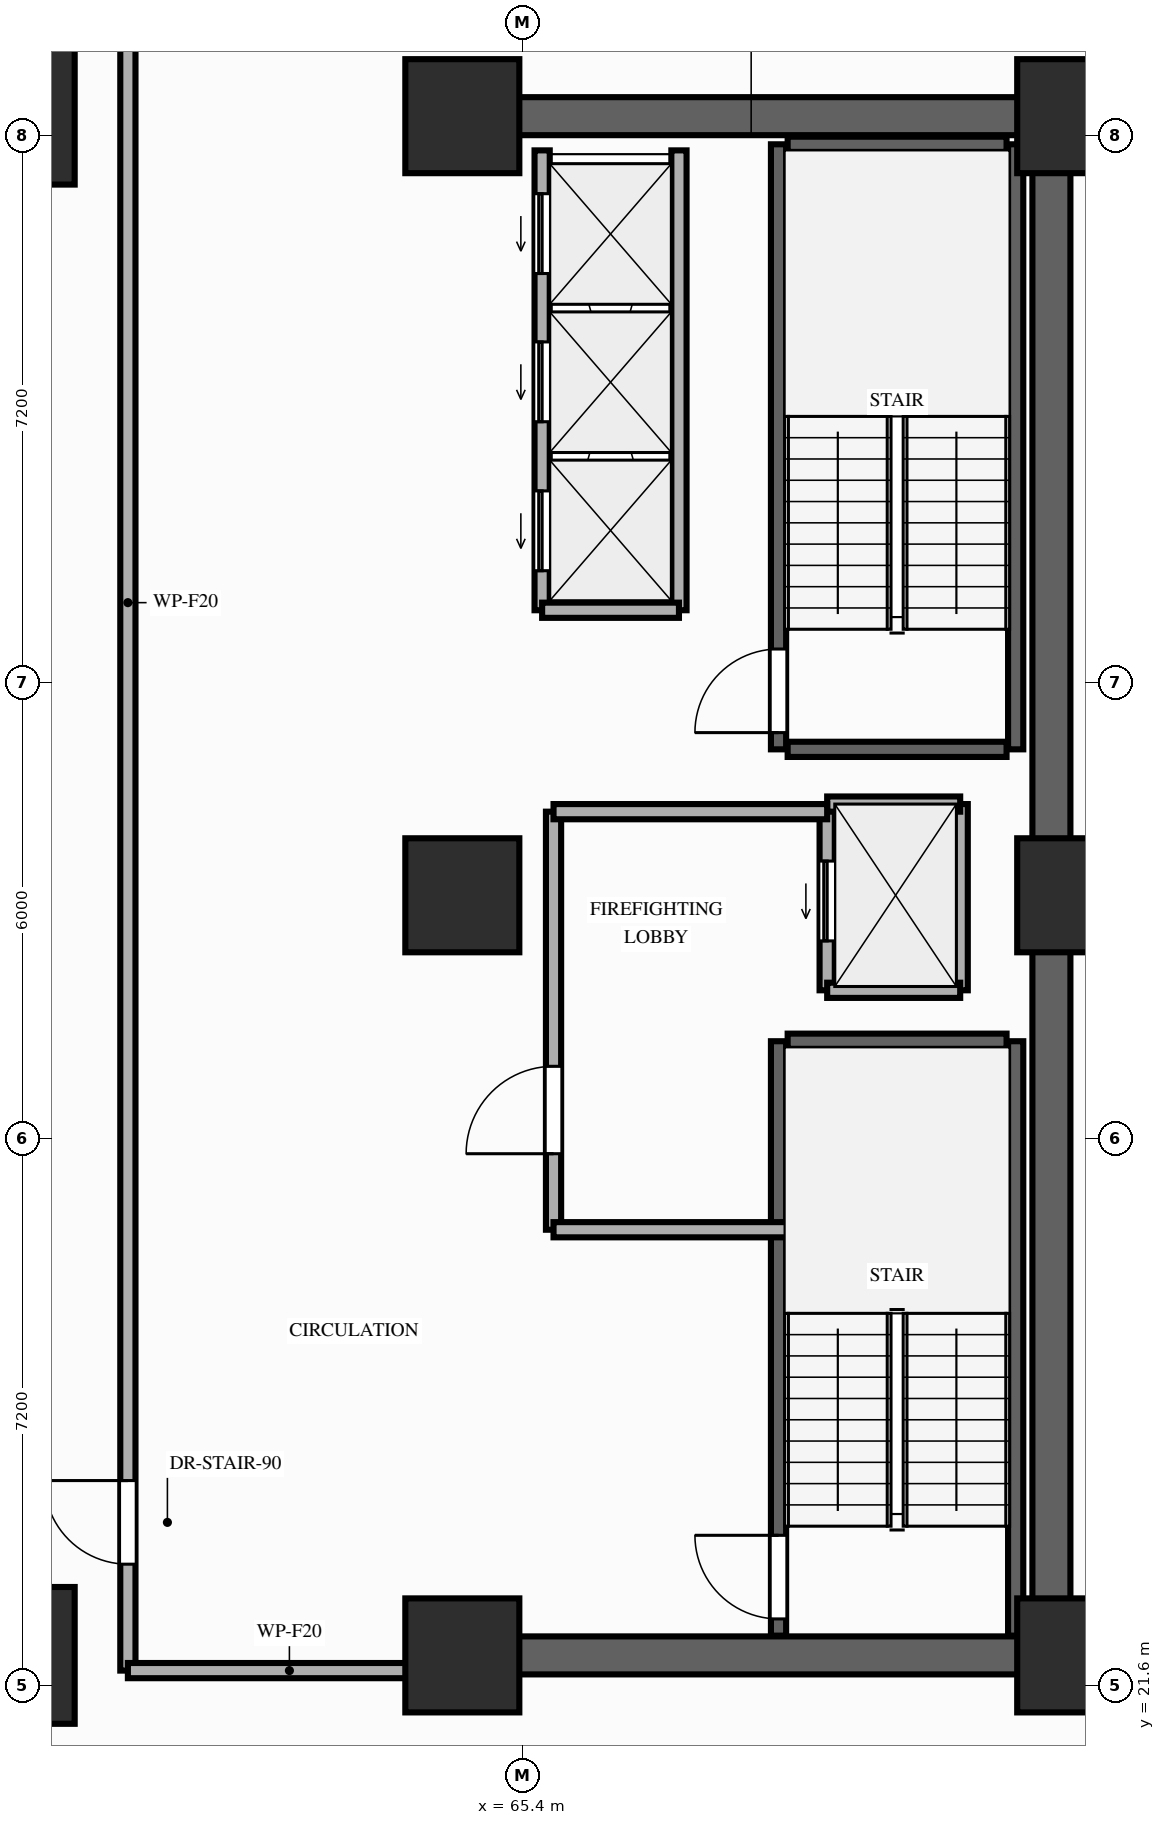
"""IFC4 building model, lengths in metres.
Left out: names, types, materials, properties, quantities, classifications, styles, units other than length and angle.
Written with IfcOpenShell. Run it as: python <this file> out.ifc"""

import sys

from ifc_helpers import new_model, si_unit, direction, frame, frame_2d, origin, origin_2d, place, context, subcontext, project, spatial, rectangle, extrude, element, fill, save


model = new_model("IFC4")
c1 = context("Model", 3, precision=1e-05, world=origin(), true_north=direction((0.0, 1.0)))
c2 = subcontext(c1, "Body", "Model", "MODEL_VIEW")
j1 = project(units=[si_unit("LENGTHUNIT", "METRE"), si_unit("PLANEANGLEUNIT", "RADIAN")], contexts=[c1])
p1 = place(None, origin())
s1 = spatial("IfcSite", under=j1, at=p1, CompositionType="ELEMENT")
p2 = place(p1, origin())
s2 = spatial("IfcBuilding", under=s1, at=p2, CompositionType="ELEMENT")
p3 = place(p2, frame((0.0, 0.0, -7.6)))
s3 = spatial("IfcBuildingStorey", under=s2, at=p3, CompositionType="ELEMENT", Elevation=-7.6)
for number, where, z_axis, x_axis in (
    (1, (64.6, 22.0, 0.0), (0.0, 0.0, 1.0), (1.0, 0.0, 0.0)),
    (2, (72.65, 22.0, 0.0), (0.0, 0.0, 1.0), (1.0, 0.0, 0.0)),
    (3, (64.6, 32.0, 0.0), (0.0, 0.0, 1.0), (1.0, 0.0, 0.0)),
    (4, (72.65, 32.0, 0.0), (0.0, 0.0, 1.0), (1.0, 0.0, 0.0)),
    (5, (64.6, 42.25, 0.0), (0.0, 0.0, 1.0), (1.0, 0.0, 0.0)),
    (6, (72.65, 42.25, 0.0), (0.0, 0.0, 1.0), (1.0, 0.0, 0.0)),
):
    element("IfcColumn", number, at=place(p3, frame(where, z_axis=z_axis, x_axis=x_axis)), inside=s3, PredefinedType="COLUMN", context=c2, shape_type="SweptSolid", body=[
        extrude(rectangle(XDim=1.5, YDim=1.5, at=origin_2d()), origin(), (0.0, 0.0, 1.0), 3.8),
    ])
for number, where, z_axis, x_axis in (
    (7, (58.6, 22.0, 0.0), (0.0, 0.0, 1.0), (1.0, 0.0, 0.0)),
    (8, (58.6, 42.25, 0.0), (0.0, 0.0, 1.0), (1.0, 0.0, 0.0)),
):
    element("IfcColumn", number, at=place(p3, frame(where, z_axis=z_axis, x_axis=x_axis)), inside=s3, PredefinedType="COLUMN", context=c2, shape_type="SweptSolid", body=[
        extrude(rectangle(XDim=1.8, YDim=1.8, at=origin_2d()), origin(), (0.0, 0.0, 1.0), 3.8),
    ])
p4 = place(p3, frame((72.35, 22.0, 0.0), z_axis=(0.0, 0.0, 1.0), x_axis=(0.0, 1.0, 0.0)))
e9 = element("IfcWall", 9, at=p4, inside=s3, PredefinedType="SHEAR", context=c2, shape_type="SweptSolid", body=[
    extrude(rectangle(XDim=20.25, YDim=0.5, at=frame_2d((10.125, 0.0))), origin(), (0.0, 0.0, 1.0), 3.55),
])
for number, where, z_axis, x_axis in (
    (10, (64.6, 42.25, 0.0), (0.0, 0.0, 1.0), (1.0, 0.0, 0.0)),
    (11, (64.6, 22.0, 0.0), (0.0, 0.0, 1.0), (1.0, 0.0, 0.0)),
):
    element("IfcWall", number, at=place(p3, frame(where, z_axis=z_axis, x_axis=x_axis)), inside=s3, PredefinedType="SHEAR", context=c2, shape_type="SweptSolid", body=[
        extrude(rectangle(XDim=7.5, YDim=0.5, at=frame_2d((3.75, 0.0))), origin(), (0.0, 0.0, 1.0), 3.55),
    ])
p5 = place(p3, frame((68.76, 22.26, 0.0), z_axis=(0.0, 0.0, 1.0), x_axis=(0.0, 1.0, 0.0)))
e12 = element("IfcWall", 12, at=p5, inside=s3, PredefinedType="SHEAR", context=c2, shape_type="SweptSolid", body=[
    extrude(rectangle(XDim=7.82, YDim=0.2, at=frame_2d((3.91, 0.0))), origin(), (0.0, 0.0, 1.0), 3.55),
])
p6 = place(p5, frame((0.22, 0.0, 0.0)))
e13 = element("IfcOpeningElement", 13, at=p6, cuts=e12, PredefinedType="OPENING", context=c2, shape_type="SweptSolid", body=[
    extrude(rectangle(XDim=1.1, YDim=2.15, at=frame_2d((0.55, 1.075))), frame((0.0, 0.11, 0.0), z_axis=(0.0, -1.0, 0.0), x_axis=(1.0, 0.0, 0.0)), (0.0, 0.0, 1.0), 0.22),
])
p7 = place(p3, frame((71.88, 22.26, 0.0), z_axis=(0.0, 0.0, 1.0), x_axis=(0.0, 1.0, 0.0)))
e14 = element("IfcWall", 14, at=p7, inside=s3, PredefinedType="SHEAR", context=c2, shape_type="SweptSolid", body=[
    extrude(rectangle(XDim=7.82, YDim=0.2, at=frame_2d((3.91, 0.0))), origin(), (0.0, 0.0, 1.0), 3.55),
])
p8 = place(p3, frame((68.88, 30.08, 0.0), z_axis=(0.0, 0.0, 1.0), x_axis=(1.0, 0.0, 0.0)))
e15 = element("IfcWall", 15, at=p8, inside=s3, PredefinedType="SHEAR", context=c2, shape_type="SweptSolid", body=[
    extrude(rectangle(XDim=2.88, YDim=0.2, at=frame_2d((1.44, 0.0))), origin(), (0.0, 0.0, 1.0), 3.55),
])
p9 = place(p3, frame((68.76, 33.92, 0.0), z_axis=(0.0, 0.0, 1.0), x_axis=(0.0, 1.0, 0.0)))
e16 = element("IfcWall", 16, at=p9, inside=s3, PredefinedType="SHEAR", context=c2, shape_type="SweptSolid", body=[
    extrude(rectangle(XDim=7.96, YDim=0.2, at=frame_2d((3.98, 0.0))), origin(), (0.0, 0.0, 1.0), 3.55),
])
p10 = place(p9, frame((0.22, 0.0, 0.0)))
e17 = element("IfcOpeningElement", 17, at=p10, cuts=e16, PredefinedType="OPENING", context=c2, shape_type="SweptSolid", body=[
    extrude(rectangle(XDim=1.1, YDim=2.15, at=frame_2d((0.55, 1.075))), frame((0.0, 0.11, 0.0), z_axis=(0.0, -1.0, 0.0), x_axis=(1.0, 0.0, 0.0)), (0.0, 0.0, 1.0), 0.22),
])
p11 = place(p3, frame((71.88, 33.92, 0.0), z_axis=(0.0, 0.0, 1.0), x_axis=(0.0, 1.0, 0.0)))
e18 = element("IfcWall", 18, at=p11, inside=s3, PredefinedType="SHEAR", context=c2, shape_type="SweptSolid", body=[
    extrude(rectangle(XDim=7.96, YDim=0.2, at=frame_2d((3.98, 0.0))), origin(), (0.0, 0.0, 1.0), 3.55),
])
for number, where, z_axis, x_axis in (
    (19, (68.88, 41.88, 0.0), (0.0, 0.0, 1.0), (1.0, 0.0, 0.0)),
    (20, (68.88, 33.92, 0.0), (0.0, 0.0, 1.0), (1.0, 0.0, 0.0)),
):
    element("IfcWall", number, at=place(p3, frame(where, z_axis=z_axis, x_axis=x_axis)), inside=s3, PredefinedType="SHEAR", context=c2, shape_type="SweptSolid", body=[
        extrude(rectangle(XDim=2.88, YDim=0.2, at=frame_2d((1.44, 0.0))), origin(), (0.0, 0.0, 1.0), 3.55),
    ])
p12 = place(p3, frame((65.65, 35.75, 0.0), z_axis=(0.0, 0.0, 1.0), x_axis=(0.0, 1.0, 0.0)))
e21 = element("IfcWall", 21, at=p12, inside=s3, PredefinedType="MOVABLE", context=c2, shape_type="SweptSolid", body=[
    extrude(rectangle(XDim=6.05, YDim=0.2, at=frame_2d((3.025, 0.0))), origin(), (0.0, 0.0, 1.0), 3.55),
])
p13 = place(p12, frame((0.52, 0.0, 0.0)))
e22 = element("IfcOpeningElement", 22, at=p13, cuts=e21, PredefinedType="OPENING", context=c2, shape_type="SweptSolid", body=[
    extrude(rectangle(XDim=1.05, YDim=2.15, at=frame_2d((0.525, 1.075))), frame((0.0, 0.11, 0.0), z_axis=(0.0, -1.0, 0.0), x_axis=(1.0, 0.0, 0.0)), (0.0, 0.0, 1.0), 0.22),
])
p14 = place(p12, frame((2.48, 0.0, 0.0)))
e23 = element("IfcOpeningElement", 23, at=p14, cuts=e21, PredefinedType="OPENING", context=c2, shape_type="SweptSolid", body=[
    extrude(rectangle(XDim=1.05, YDim=2.15, at=frame_2d((0.525, 1.075))), frame((0.0, 0.11, 0.0), z_axis=(0.0, -1.0, 0.0), x_axis=(1.0, 0.0, 0.0)), (0.0, 0.0, 1.0), 0.22),
])
p15 = place(p12, frame((4.43, 0.0, 0.0)))
e24 = element("IfcOpeningElement", 24, at=p15, cuts=e21, PredefinedType="OPENING", context=c2, shape_type="SweptSolid", body=[
    extrude(rectangle(XDim=1.05, YDim=2.15, at=frame_2d((0.525, 1.075))), frame((0.0, 0.11, 0.0), z_axis=(0.0, -1.0, 0.0), x_axis=(1.0, 0.0, 0.0)), (0.0, 0.0, 1.0), 0.22),
])
p16 = place(p3, frame((67.45, 35.75, 0.0), z_axis=(0.0, 0.0, 1.0), x_axis=(0.0, 1.0, 0.0)))
e25 = element("IfcWall", 25, at=p16, inside=s3, PredefinedType="MOVABLE", context=c2, shape_type="SweptSolid", body=[
    extrude(rectangle(XDim=6.05, YDim=0.2, at=frame_2d((3.025, 0.0))), origin(), (0.0, 0.0, 1.0), 3.55),
])
p17 = place(p3, frame((65.65, 35.75, 0.0), z_axis=(0.0, 0.0, 1.0), x_axis=(1.0, 0.0, 0.0)))
e26 = element("IfcWall", 26, at=p17, inside=s3, PredefinedType="MOVABLE", context=c2, shape_type="SweptSolid", body=[
    extrude(rectangle(XDim=1.8, YDim=0.2, at=frame_2d((0.9, 0.0))), origin(), (0.0, 0.0, 1.0), 3.55),
])
p18 = place(p3, frame((69.4, 30.75, 0.0), z_axis=(0.0, 0.0, 1.0), x_axis=(0.0, 1.0, 0.0)))
e27 = element("IfcWall", 27, at=p18, inside=s3, PredefinedType="MOVABLE", context=c2, shape_type="SweptSolid", body=[
    extrude(rectangle(XDim=2.45, YDim=0.2, at=frame_2d((1.225, 0.0))), origin(), (0.0, 0.0, 1.0), 3.55),
])
p19 = place(p18, frame((0.65, 0.0, 0.0)))
e28 = element("IfcOpeningElement", 28, at=p19, cuts=e27, PredefinedType="OPENING", context=c2, shape_type="SweptSolid", body=[
    extrude(rectangle(XDim=1.05, YDim=2.15, at=frame_2d((0.525, 1.075))), frame((0.0, 0.11, 0.0), z_axis=(0.0, -1.0, 0.0), x_axis=(1.0, 0.0, 0.0)), (0.0, 0.0, 1.0), 0.22),
])
p20 = place(p3, frame((71.15, 30.75, 0.0), z_axis=(0.0, 0.0, 1.0), x_axis=(0.0, 1.0, 0.0)))
e29 = element("IfcWall", 29, at=p20, inside=s3, PredefinedType="MOVABLE", context=c2, shape_type="SweptSolid", body=[
    extrude(rectangle(XDim=2.45, YDim=0.2, at=frame_2d((1.225, 0.0))), origin(), (0.0, 0.0, 1.0), 3.55),
])
for number, where, z_axis, x_axis in (
    (30, (69.4, 33.2, 0.0), (0.0, 0.0, 1.0), (1.0, 0.0, 0.0)),
    (31, (69.4, 30.75, 0.0), (0.0, 0.0, 1.0), (1.0, 0.0, 0.0)),
):
    element("IfcWall", number, at=place(p3, frame(where, z_axis=z_axis, x_axis=x_axis)), inside=s3, PredefinedType="MOVABLE", context=c2, shape_type="SweptSolid", body=[
        extrude(rectangle(XDim=1.75, YDim=0.2, at=frame_2d((0.875, 0.0))), origin(), (0.0, 0.0, 1.0), 3.55),
    ])
p21 = place(p3, frame((65.8, 27.6, 0.0), z_axis=(0.0, 0.0, 1.0), x_axis=(0.0, 1.0, 0.0)))
e32 = element("IfcWall", 32, at=p21, inside=s3, PredefinedType="PARTITIONING", context=c2, shape_type="SweptSolid", body=[
    extrude(rectangle(XDim=5.5, YDim=0.2, at=frame_2d((2.75, 0.0))), origin(), (0.0, 0.0, 1.0), 3.55),
])
p22 = place(p21, frame((1.0, 0.0, 0.0)))
e33 = element("IfcOpeningElement", 33, at=p22, cuts=e32, PredefinedType="OPENING", context=c2, shape_type="SweptSolid", body=[
    extrude(rectangle(XDim=1.15, YDim=2.15, at=frame_2d((0.575, 1.075))), frame((0.0, 0.11, 0.0), z_axis=(0.0, -1.0, 0.0), x_axis=(1.0, 0.0, 0.0)), (0.0, 0.0, 1.0), 0.22),
])
p23 = place(p3, frame((65.8, 33.1, 0.0), z_axis=(0.0, 0.0, 1.0), x_axis=(1.0, 0.0, 0.0)))
e34 = element("IfcWall", 34, at=p23, inside=s3, PredefinedType="PARTITIONING", context=c2, shape_type="SweptSolid", body=[
    extrude(rectangle(XDim=3.6, YDim=0.2, at=frame_2d((1.8, 0.0))), origin(), (0.0, 0.0, 1.0), 3.55),
])
p24 = place(p3, frame((65.8, 27.6, 0.0), z_axis=(0.0, 0.0, 1.0), x_axis=(1.0, 0.0, 0.0)))
e35 = element("IfcWall", 35, at=p24, inside=s3, PredefinedType="PARTITIONING", context=c2, shape_type="SweptSolid", body=[
    extrude(rectangle(XDim=3.4, YDim=0.2, at=frame_2d((1.7, 0.0))), origin(), (0.0, 0.0, 1.0), 3.55),
])
p25 = place(p3, frame((60.2, 21.8, 0.0), z_axis=(0.0, 0.0, 1.0), x_axis=(0.0, 1.0, 0.0)))
e36 = element("IfcWall", 36, at=p25, inside=s3, PredefinedType="PARTITIONING", context=c2, shape_type="SweptSolid", body=[
    extrude(rectangle(XDim=28.1, YDim=0.2, at=frame_2d((14.05, 0.0))), origin(), (0.0, 0.0, 1.0), 2.72),
])
p26 = place(p25, frame((1.4, 0.0, 0.0)))
e37 = element("IfcOpeningElement", 37, at=p26, cuts=e36, PredefinedType="OPENING", context=c2, shape_type="SweptSolid", body=[
    extrude(rectangle(XDim=1.1, YDim=2.15, at=frame_2d((0.55, 1.075))), frame((0.0, 0.11, 0.0), z_axis=(0.0, -1.0, 0.0), x_axis=(1.0, 0.0, 0.0)), (0.0, 0.0, 1.0), 0.22),
])
p27 = place(p3, frame((60.2, 21.8, 0.0), z_axis=(0.0, 0.0, 1.0), x_axis=(1.0, 0.0, 0.0)))
e38 = element("IfcWall", 38, at=p27, inside=s3, PredefinedType="PARTITIONING", context=c2, shape_type="SweptSolid", body=[
    extrude(rectangle(XDim=4.25, YDim=0.2, at=frame_2d((2.125, 0.0))), origin(), (0.0, 0.0, 1.0), 2.72),
])
p28 = place(p3, frame((72.65, 21.8, 0.0), z_axis=(0.0, 0.0, 1.0), x_axis=(1.0, 0.0, 0.0)))
e39 = element("IfcWall", 39, at=p28, inside=s3, PredefinedType="PARTITIONING", context=c2, shape_type="SweptSolid", body=[
    extrude(rectangle(XDim=9.65, YDim=0.2, at=frame_2d((4.825, 0.0))), origin(), (0.0, 0.0, 1.0), 2.72),
])
p29 = place(p6, origin())
e40 = element("IfcDoor", 40, at=p29, inside=s3, OperationType="SINGLE_SWING_RIGHT", PredefinedType="DOOR", context=c2, shape_type="SweptSolid", body=[
    extrude(rectangle(XDim=1.1, YDim=2.15, at=frame_2d((0.55, 1.075))), frame((0.0, 0.025, 0.0), z_axis=(0.0, -1.0, 0.0), x_axis=(1.0, 0.0, 0.0)), (0.0, 0.0, 1.0), 0.05),
])
fill(e13, e40)
p30 = place(p10, origin())
e41 = element("IfcDoor", 41, at=p30, inside=s3, OperationType="SINGLE_SWING_LEFT", PredefinedType="DOOR", context=c2, shape_type="SweptSolid", body=[
    extrude(rectangle(XDim=1.1, YDim=2.15, at=frame_2d((0.55, 1.075))), frame((0.0, 0.025, 0.0), z_axis=(0.0, -1.0, 0.0), x_axis=(1.0, 0.0, 0.0)), (0.0, 0.0, 1.0), 0.05),
])
fill(e17, e41)
p31 = place(p13, origin())
e42 = element("IfcDoor", 42, at=p31, inside=s3, OperationType="SLIDING_TO_LEFT", PredefinedType="DOOR", context=c2, shape_type="SweptSolid", body=[
    extrude(rectangle(XDim=1.05, YDim=2.15, at=frame_2d((0.525, 1.075))), frame((0.0, 0.025, 0.0), z_axis=(0.0, -1.0, 0.0), x_axis=(1.0, 0.0, 0.0)), (0.0, 0.0, 1.0), 0.05),
])
fill(e22, e42)
p32 = place(p14, origin())
e43 = element("IfcDoor", 43, at=p32, inside=s3, OperationType="SLIDING_TO_LEFT", PredefinedType="DOOR", context=c2, shape_type="SweptSolid", body=[
    extrude(rectangle(XDim=1.05, YDim=2.15, at=frame_2d((0.525, 1.075))), frame((0.0, 0.025, 0.0), z_axis=(0.0, -1.0, 0.0), x_axis=(1.0, 0.0, 0.0)), (0.0, 0.0, 1.0), 0.05),
])
fill(e23, e43)
p33 = place(p15, origin())
e44 = element("IfcDoor", 44, at=p33, inside=s3, OperationType="SLIDING_TO_LEFT", PredefinedType="DOOR", context=c2, shape_type="SweptSolid", body=[
    extrude(rectangle(XDim=1.05, YDim=2.15, at=frame_2d((0.525, 1.075))), frame((0.0, 0.025, 0.0), z_axis=(0.0, -1.0, 0.0), x_axis=(1.0, 0.0, 0.0)), (0.0, 0.0, 1.0), 0.05),
])
fill(e24, e44)
p34 = place(p19, origin())
e45 = element("IfcDoor", 45, at=p34, inside=s3, OperationType="SLIDING_TO_LEFT", PredefinedType="DOOR", context=c2, shape_type="SweptSolid", body=[
    extrude(rectangle(XDim=1.05, YDim=2.15, at=frame_2d((0.525, 1.075))), frame((0.0, 0.025, 0.0), z_axis=(0.0, -1.0, 0.0), x_axis=(1.0, 0.0, 0.0)), (0.0, 0.0, 1.0), 0.05),
])
fill(e28, e45)
p35 = place(p22, origin())
e46 = element("IfcDoor", 46, at=p35, inside=s3, OperationType="SINGLE_SWING_LEFT", PredefinedType="DOOR", context=c2, shape_type="SweptSolid", body=[
    extrude(rectangle(XDim=1.15, YDim=2.15, at=frame_2d((0.575, 1.075))), frame((0.0, 0.025, 0.0), z_axis=(0.0, -1.0, 0.0), x_axis=(1.0, 0.0, 0.0)), (0.0, 0.0, 1.0), 0.05),
])
fill(e33, e46)
p36 = place(p26, origin())
e47 = element("IfcDoor", 47, at=p36, inside=s3, OperationType="SINGLE_SWING_RIGHT", PredefinedType="DOOR", context=c2, shape_type="SweptSolid", body=[
    extrude(rectangle(XDim=1.1, YDim=2.15, at=frame_2d((0.55, 1.075))), frame((0.0, 0.025, 0.0), z_axis=(0.0, -1.0, 0.0), x_axis=(1.0, 0.0, 0.0)), (0.0, 0.0, 1.0), 0.05),
])
fill(e37, e47)
save(model, sys.argv[1])
